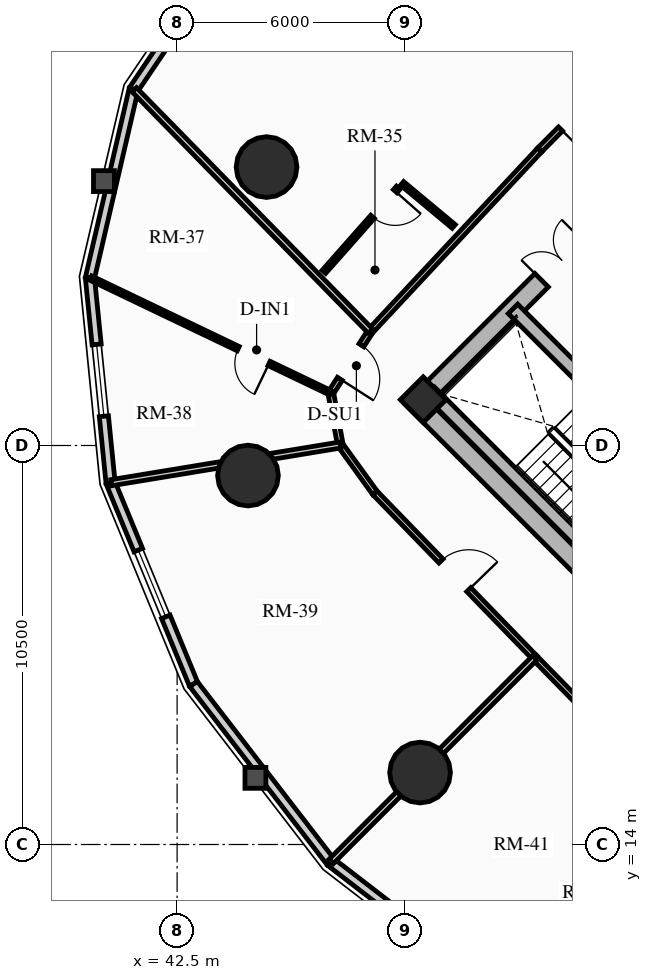
"""IFC4 building model, lengths in metres.
Left out: names, types, materials, properties, quantities, classifications, styles, units other than length and angle.
Written with IfcOpenShell. Run it as: python <this file> out.ifc"""

import sys

from ifc_helpers import new_model, si_unit, direction, frame, frame_2d, origin, origin_2d, place, context, subcontext, project, spatial, rectangle, circle, extrude, source, transform, mapped, element, fill, save


model = new_model("IFC4")
c1 = context("Model", 3, precision=1e-05, world=origin(), true_north=direction((0.0, 1.0)))
c2 = subcontext(c1, "Body", "Model", "MODEL_VIEW")
j1 = project(units=[si_unit("LENGTHUNIT", "METRE"), si_unit("PLANEANGLEUNIT", "RADIAN")], contexts=[c1])
p1 = place(None, origin())
s1 = spatial("IfcSite", under=j1, at=p1, CompositionType="ELEMENT")
p2 = place(p1, origin())
s2 = spatial("IfcBuilding", under=s1, at=p2, CompositionType="ELEMENT")
p3 = place(p2, frame((0.0, 0.0, 33.64)))
s3 = spatial("IfcBuildingStorey", under=s2, at=p3, CompositionType="ELEMENT", Elevation=33.64)
p4 = place(p3, frame((58.773, 15.661, 0.0), z_axis=(0.0, 0.0, 1.0), x_axis=(-0.707106781187, 0.707106781187, 0.0)))
e1 = element("IfcWall", 1, at=p4, inside=s3, PredefinedType="SHEAR", context=c2, shape_type="SweptSolid", body=[
    extrude(rectangle(XDim=14.3, YDim=0.5, at=frame_2d((7.15, 0.0))), origin(), (0.0, 0.0, 1.0), 2.91),
])
p5 = place(p3, frame((48.838, 25.596, 0.0), z_axis=(0.0, 0.0, 1.0), x_axis=(0.707106781187, 0.707106781187, 0.0)))
e2 = element("IfcWall", 2, at=p5, inside=s3, PredefinedType="SHEAR", context=c2, shape_type="SweptSolid", body=[
    extrude(rectangle(XDim=10.7, YDim=0.5, at=frame_2d((5.35, 0.0))), origin(), (0.0, 0.0, 1.0), 2.91),
])
m1 = source(origin(), c2, "Body", "SweptSolid", [
    extrude(rectangle(XDim=1.5, YDim=2.02, at=frame_2d((0.75, 1.01))), frame((0.0, 0.26, 0.0), z_axis=(0.0, -1.0, 0.0), x_axis=(1.0, 0.0, 0.0)), (0.0, 0.0, 1.0), 0.52),
])
p6 = place(p5, frame((4.6, 0.0, 0.0)))
e3 = element("IfcOpeningElement", 3, at=p6, cuts=e2, PredefinedType="OPENING", context=c2, shape_type="MappedRepresentation", body=[
    mapped(m1, transform((0.0, 0.0, 0.0), x_axis=(1.0, 0.0, 0.0), y_axis=(0.0, 1.0, 0.0), z_axis=(0.0, 0.0, 1.0), scale=1.0)),
])
p7 = place(p3, frame((61.096, 18.338, 0.0), z_axis=(0.0, 0.0, 1.0), x_axis=(-0.707106781187, 0.707106781187, 0.0)))
e4 = element("IfcWall", 4, at=p7, inside=s3, PredefinedType="SHEAR", context=c2, shape_type="SweptSolid", body=[
    extrude(rectangle(XDim=13.8, YDim=0.35, at=frame_2d((6.9, 0.0))), origin(), (0.0, 0.0, 1.0), 2.91),
])
m2 = source(origin(), c2, "Body", "SweptSolid", [
    extrude(rectangle(XDim=1.1, YDim=2.015, at=frame_2d((0.55, 1.007))), frame((0.0, 0.185, 0.0), z_axis=(0.0, -1.0, 0.0), x_axis=(1.0, 0.0, 0.0)), (0.0, 0.0, 1.0), 0.37),
])
p8 = place(p7, frame((4.9, 0.0, 0.0)))
e5 = element("IfcOpeningElement", 5, at=p8, cuts=e4, PredefinedType="OPENING", context=c2, shape_type="MappedRepresentation", body=[
    mapped(m2, transform((0.0, 0.0, 0.0), x_axis=(1.0, 0.0, 0.0), y_axis=(0.0, 1.0, 0.0), z_axis=(0.0, 0.0, 1.0), scale=1.0)),
])
m3 = source(origin(), c2, "Body", "SweptSolid", [
    extrude(rectangle(XDim=1.15, YDim=2.02, at=frame_2d((0.575, 1.01))), frame((0.0, 0.185, 0.0), z_axis=(0.0, -1.0, 0.0), x_axis=(1.0, 0.0, 0.0)), (0.0, 0.0, 1.0), 0.37),
])
p9 = place(p7, frame((7.32, 0.0, 0.0)))
e6 = element("IfcOpeningElement", 6, at=p9, cuts=e4, PredefinedType="OPENING", context=c2, shape_type="MappedRepresentation", body=[
    mapped(m3, transform((0.0, 0.0, 0.0), x_axis=(1.0, 0.0, 0.0), y_axis=(0.0, 1.0, 0.0), z_axis=(0.0, 0.0, 1.0), scale=1.0)),
])
p10 = place(p3, frame((53.922, 21.141, 0.0), z_axis=(0.0, 0.0, 1.0), x_axis=(-0.707106781187, 0.707106781187, 0.0)))
e7 = element("IfcWall", 7, at=p10, inside=s3, PredefinedType="SHEAR", context=c2, shape_type="SweptSolid", body=[
    extrude(rectangle(XDim=6.745, YDim=0.35, at=frame_2d((3.373, 0.0))), origin(), (0.0, 0.0, 1.0), 2.91),
])
p11 = place(p3, frame((48.976, 25.706, 0.0), z_axis=(0.0, 0.0, 1.0), x_axis=(0.707106781187, 0.707106781187, 0.0)))
e8 = element("IfcColumn", 8, at=p11, inside=s3, PredefinedType="COLUMN", context=c2, shape_type="SweptSolid", body=[
    extrude(rectangle(XDim=0.85, YDim=0.85, at=origin_2d()), origin(), (0.0, 0.0, 1.0), 2.91),
])
for number, where, z_axis, x_axis in (
    (9, (44.854, 31.827, 0.0), (0.0, 0.0, 1.0), (1.0, 0.0, 0.0)),
    (10, (44.365, 23.709, 0.0), (0.0, 0.0, 1.0), (1.0, 0.0, 0.0)),
    (11, (48.893, 15.893, 0.0), (0.0, 0.0, 1.0), (1.0, 0.0, 0.0)),
):
    element("IfcColumn", number, at=place(p3, frame(where, z_axis=z_axis, x_axis=x_axis)), inside=s3, PredefinedType="USERDEFINED", context=c2, shape_type="SweptSolid", body=[
        extrude(circle(Radius=0.8, at=origin_2d()), origin(), (0.0, 0.0, 1.0), 2.91),
    ])
p12 = place(p3, frame((41.356, 33.871, 0.0), z_axis=(0.0, 0.0, 1.0), x_axis=(0.559621532896, 0.828748297084, 0.0)))
e12 = element("IfcWall", 12, at=p12, inside=s3, PredefinedType="SOLIDWALL", context=c2, shape_type="SweptSolid", body=[
    extrude(rectangle(XDim=4.879, YDim=0.24, at=frame_2d((2.439, 0.0))), origin(), (0.0, 0.0, 1.0), 2.073),
])
m4 = source(origin(), c2, "Body", "SweptSolid", [
    extrude(rectangle(XDim=1.9, YDim=1.35, at=frame_2d((0.95, 0.675))), frame((0.0, 0.13, 0.0), z_axis=(0.0, -1.0, 0.0), x_axis=(1.0, 0.0, 0.0)), (0.0, 0.0, 1.0), 0.26),
])
p13 = place(p12, frame((1.489, 0.0, 0.65)))
e13 = element("IfcOpeningElement", 13, at=p13, cuts=e12, PredefinedType="OPENING", context=c2, shape_type="MappedRepresentation", body=[
    mapped(m4, transform((0.0, 0.0, 0.0), x_axis=(1.0, 0.0, 0.0), y_axis=(0.0, 1.0, 0.0), z_axis=(0.0, 0.0, 1.0), scale=1.0)),
])
p14 = place(p3, frame((40.206, 28.91, 0.0), z_axis=(0.0, 0.0, 1.0), x_axis=(0.22582585901, 0.974167686491, 0.0)))
e14 = element("IfcWall", 14, at=p14, inside=s3, PredefinedType="SOLIDWALL", context=c2, shape_type="SweptSolid", body=[
    extrude(rectangle(XDim=5.092, YDim=0.24, at=frame_2d((2.546, 0.0))), origin(), (0.0, 0.0, 1.0), 2.073),
])
p15 = place(p3, frame((40.749, 23.518, 0.0), z_axis=(0.0, 0.0, 1.0), x_axis=(-0.100190592135, 0.994968263437, 0.0)))
e15 = element("IfcWall", 15, at=p15, inside=s3, PredefinedType="SOLIDWALL", context=c2, shape_type="SweptSolid", body=[
    extrude(rectangle(XDim=5.419, YDim=0.24, at=frame_2d((2.71, 0.0))), origin(), (0.0, 0.0, 1.0), 2.073),
])
p16 = place(p15, frame((1.76, 0.0, 0.65)))
e16 = element("IfcOpeningElement", 16, at=p16, cuts=e15, PredefinedType="OPENING", context=c2, shape_type="MappedRepresentation", body=[
    mapped(m4, transform((0.0, 0.0, 0.0), x_axis=(1.0, 0.0, 0.0), y_axis=(0.0, 1.0, 0.0), z_axis=(0.0, 0.0, 1.0), scale=1.0)),
])
p17 = place(p3, frame((42.932, 18.222, 0.0), z_axis=(0.0, 0.0, 1.0), x_axis=(-0.381077764176, 0.924542988536, 0.0)))
e17 = element("IfcWall", 17, at=p17, inside=s3, PredefinedType="SOLIDWALL", context=c2, shape_type="SweptSolid", body=[
    extrude(rectangle(XDim=5.728, YDim=0.24, at=frame_2d((2.864, 0.0))), origin(), (0.0, 0.0, 1.0), 2.073),
])
p18 = place(p17, frame((1.914, 0.0, 0.65)))
e18 = element("IfcOpeningElement", 18, at=p18, cuts=e17, PredefinedType="OPENING", context=c2, shape_type="MappedRepresentation", body=[
    mapped(m4, transform((0.0, 0.0, 0.0), x_axis=(1.0, 0.0, 0.0), y_axis=(0.0, 1.0, 0.0), z_axis=(0.0, 0.0, 1.0), scale=1.0)),
])
p19 = place(p3, frame((46.541, 13.541, 0.0), z_axis=(0.0, 0.0, 1.0), x_axis=(-0.610494906082, 0.792020182601, 0.0)))
e19 = element("IfcWall", 19, at=p19, inside=s3, PredefinedType="SOLIDWALL", context=c2, shape_type="SweptSolid", body=[
    extrude(rectangle(XDim=5.911, YDim=0.24, at=frame_2d((2.956, 0.0))), origin(), (0.0, 0.0, 1.0), 2.073),
])
p20 = place(p3, frame((51.222, 9.932, 0.0), z_axis=(0.0, 0.0, 1.0), x_axis=(-0.792020182601, 0.610494906082, 0.0)))
e20 = element("IfcWall", 20, at=p20, inside=s3, PredefinedType="SOLIDWALL", context=c2, shape_type="SweptSolid", body=[
    extrude(rectangle(XDim=5.911, YDim=0.24, at=frame_2d((2.956, 0.0))), origin(), (0.0, 0.0, 1.0), 2.073),
])
p21 = place(p20, frame((2.005, 0.0, 0.65)))
e21 = element("IfcOpeningElement", 21, at=p21, cuts=e20, PredefinedType="OPENING", context=c2, shape_type="MappedRepresentation", body=[
    mapped(m4, transform((0.0, 0.0, 0.0), x_axis=(1.0, 0.0, 0.0), y_axis=(0.0, 1.0, 0.0), z_axis=(0.0, 0.0, 1.0), scale=1.0)),
])
p22 = place(p3, frame((54.427, 34.683, 0.0), z_axis=(0.0, 0.0, 1.0), x_axis=(-0.704178989986, -0.710022499687, 0.0)))
e22 = element("IfcWall", 22, at=p22, inside=s3, PredefinedType="PARTITIONING", context=c2, shape_type="SweptSolid", body=[
    extrude(rectangle(XDim=3.384, YDim=0.15, at=frame_2d((1.692, 0.0))), origin(), (0.0, 0.0, 1.0), 2.159),
])
m5 = source(origin(), c2, "Body", "SweptSolid", [
    extrude(rectangle(XDim=1.05, YDim=2.015, at=frame_2d((0.525, 1.007))), frame((0.0, 0.085, 0.0), z_axis=(0.0, -1.0, 0.0), x_axis=(1.0, 0.0, 0.0)), (0.0, 0.0, 1.0), 0.17),
])
p23 = place(p22, frame((1.56, 0.0, 0.0)))
e23 = element("IfcOpeningElement", 23, at=p23, cuts=e22, PredefinedType="OPENING", context=c2, shape_type="MappedRepresentation", body=[
    mapped(m5, transform((0.0, 0.0, 0.0), x_axis=(1.0, 0.0, 0.0), y_axis=(0.0, 1.0, 0.0), z_axis=(0.0, 0.0, 1.0), scale=1.0)),
])
p24 = place(p3, frame((52.043, 32.28, 0.0), z_axis=(0.0, 0.0, 1.0), x_axis=(-0.682606081633, -0.730786519661, 0.0)))
e24 = element("IfcWall", 24, at=p24, inside=s3, PredefinedType="PARTITIONING", context=c2, shape_type="SweptSolid", body=[
    extrude(rectangle(XDim=6.527, YDim=0.15, at=frame_2d((3.263, 0.0))), origin(), (0.0, 0.0, 1.0), 2.159),
])
p25 = place(p3, frame((47.588, 27.51, 0.0), z_axis=(0.0, 0.0, 1.0), x_axis=(-0.540202619347, -0.841534984449, 0.0)))
e25 = element("IfcWall", 25, at=p25, inside=s3, PredefinedType="PARTITIONING", context=c2, shape_type="SweptSolid", body=[
    extrude(rectangle(XDim=1.935, YDim=0.15, at=frame_2d((0.967, 0.0))), origin(), (0.0, 0.0, 1.0), 2.159),
])
p26 = place(p25, frame((0.442, 0.0, 0.0)))
e26 = element("IfcOpeningElement", 26, at=p26, cuts=e25, PredefinedType="OPENING", context=c2, shape_type="MappedRepresentation", body=[
    mapped(m5, transform((0.0, 0.0, 0.0), x_axis=(1.0, 0.0, 0.0), y_axis=(0.0, 1.0, 0.0), z_axis=(0.0, 0.0, 1.0), scale=1.0)),
])
p27 = place(p3, frame((46.543, 25.882, 0.0), z_axis=(0.0, 0.0, 1.0), x_axis=(0.181153502579, -0.983454832976, 0.0)))
e27 = element("IfcWall", 27, at=p27, inside=s3, PredefinedType="PARTITIONING", context=c2, shape_type="SweptSolid", body=[
    extrude(rectangle(XDim=1.392, YDim=0.15, at=frame_2d((0.696, 0.0))), origin(), (0.0, 0.0, 1.0), 2.159),
])
p28 = place(p3, frame((46.795, 24.513, 0.0), z_axis=(0.0, 0.0, 1.0), x_axis=(0.585628197524, -0.810579801294, 0.0)))
e28 = element("IfcWall", 28, at=p28, inside=s3, PredefinedType="PARTITIONING", context=c2, shape_type="SweptSolid", body=[
    extrude(rectangle(XDim=1.554, YDim=0.15, at=frame_2d((0.777, 0.0))), origin(), (0.0, 0.0, 1.0), 2.205),
])
p29 = place(p3, frame((47.706, 23.253, 0.0), z_axis=(0.0, 0.0, 1.0), x_axis=(0.696179266346, -0.717867974707, 0.0)))
e29 = element("IfcWall", 29, at=p29, inside=s3, PredefinedType="PARTITIONING", context=c2, shape_type="SweptSolid", body=[
    extrude(rectangle(XDim=6.045, YDim=0.15, at=frame_2d((3.022, 0.0))), origin(), (0.0, 0.0, 1.0), 2.635),
])
p30 = place(p29, frame((2.497, 0.0, 0.0)))
e30 = element("IfcOpeningElement", 30, at=p30, cuts=e29, PredefinedType="OPENING", context=c2, shape_type="MappedRepresentation", body=[
    mapped(m5, transform((0.0, 0.0, 0.0), x_axis=(1.0, 0.0, 0.0), y_axis=(0.0, 1.0, 0.0), z_axis=(0.0, 0.0, 1.0), scale=1.0)),
])
p31 = place(p3, frame((51.914, 18.914, 0.0), z_axis=(0.0, 0.0, 1.0), x_axis=(0.699999313799, -0.714143515465, 0.0)))
e31 = element("IfcWall", 31, at=p31, inside=s3, PredefinedType="PARTITIONING", context=c2, shape_type="SweptSolid", body=[
    extrude(rectangle(XDim=6.162, YDim=0.15, at=frame_2d((3.081, 0.0))), origin(), (0.0, 0.0, 1.0), 2.159),
])
p32 = place(p31, frame((2.556, 0.0, 0.0)))
e32 = element("IfcOpeningElement", 32, at=p32, cuts=e31, PredefinedType="OPENING", context=c2, shape_type="MappedRepresentation", body=[
    mapped(m5, transform((0.0, 0.0, 0.0), x_axis=(1.0, 0.0, 0.0), y_axis=(0.0, 1.0, 0.0), z_axis=(0.0, 0.0, 1.0), scale=1.0)),
])
p33 = place(p3, frame((54.427, 34.683, 0.0), z_axis=(0.0, 0.0, 1.0), x_axis=(-0.726732956694, 0.686920089716, 0.0)))
e33 = element("IfcWall", 33, at=p33, inside=s3, PredefinedType="PARTITIONING", context=c2, shape_type="SweptSolid", body=[
    extrude(rectangle(XDim=8.653, YDim=0.16, at=frame_2d((4.326, 0.0))), origin(), (0.0, 0.0, 1.0), 2.073),
])
p34 = place(p3, frame((47.588, 27.51, 0.0), z_axis=(0.0, 0.0, 1.0), x_axis=(-0.699371977892, 0.714757886657, 0.0)))
e34 = element("IfcWall", 34, at=p34, inside=s3, PredefinedType="PARTITIONING", context=c2, shape_type="SweptSolid", body=[
    extrude(rectangle(XDim=8.886, YDim=0.16, at=frame_2d((4.443, 0.0))), origin(), (0.0, 0.0, 1.0), 2.073),
])
p35 = place(p3, frame((46.795, 24.513, 0.0), z_axis=(0.0, 0.0, 1.0), x_axis=(-0.986729986004, -0.162369746937, 0.0)))
e35 = element("IfcWall", 35, at=p35, inside=s3, PredefinedType="PARTITIONING", context=c2, shape_type="SweptSolid", body=[
    extrude(rectangle(XDim=6.108, YDim=0.16, at=frame_2d((3.054, 0.0))), origin(), (0.0, 0.0, 1.0), 2.073),
])
p36 = place(p3, frame((51.914, 18.914, 0.0), z_axis=(0.0, 0.0, 1.0), x_axis=(-0.707106781187, -0.707106781187, 0.0)))
e36 = element("IfcWall", 36, at=p36, inside=s3, PredefinedType="PARTITIONING", context=c2, shape_type="SweptSolid", body=[
    extrude(rectangle(XDim=7.579, YDim=0.16, at=frame_2d((3.79, 0.0))), origin(), (0.0, 0.0, 1.0), 2.073),
])
p37 = place(p3, frame((49.78, 30.264, 0.0), z_axis=(0.0, 0.0, 1.0), x_axis=(-0.768209972595, 0.640197967824, 0.0)))
e37 = element("IfcWall", 37, at=p37, inside=s3, PredefinedType="PARTITIONING", context=c2, shape_type="SweptSolid", body=[
    extrude(rectangle(XDim=1.77, YDim=0.125, at=frame_2d((0.885, 0.0))), origin(), (0.0, 0.0, 1.0), 2.635),
])
p38 = place(p3, frame((48.318, 31.282, 0.0), z_axis=(0.0, 0.0, 1.0), x_axis=(-0.662365127428, -0.749181178333, 0.0)))
e38 = element("IfcWall", 38, at=p38, inside=s3, PredefinedType="PARTITIONING", context=c2, shape_type="SweptSolid", body=[
    extrude(rectangle(XDim=2.953, YDim=0.125, at=frame_2d((1.477, 0.0))), origin(), (0.0, 0.0, 1.0), 2.159),
])
m6 = source(origin(), c2, "Body", "SweptSolid", [
    extrude(rectangle(XDim=0.9, YDim=2.005, at=frame_2d((0.45, 1.002))), frame((0.0, 0.073, 0.0), z_axis=(0.0, -1.0, 0.0), x_axis=(1.0, 0.0, 0.0)), (0.0, 0.0, 1.0), 0.145),
])
p39 = place(p38, frame((0.12, 0.0, 0.0)))
e39 = element("IfcOpeningElement", 39, at=p39, cuts=e38, PredefinedType="OPENING", context=c2, shape_type="MappedRepresentation", body=[
    mapped(m6, transform((0.0, 0.0, 0.0), x_axis=(1.0, 0.0, 0.0), y_axis=(0.0, 1.0, 0.0), z_axis=(0.0, 0.0, 1.0), scale=1.0)),
])
p40 = place(p3, frame((46.543, 25.882, 0.0), z_axis=(0.0, 0.0, 1.0), x_axis=(-0.901937110034, 0.431867398103, 0.0)))
e40 = element("IfcWall", 40, at=p40, inside=s3, PredefinedType="PARTITIONING", context=c2, shape_type="SweptSolid", body=[
    extrude(rectangle(XDim=7.004, YDim=0.125, at=frame_2d((3.502, 0.0))), origin(), (0.0, 0.0, 1.0), 2.073),
])
p41 = place(p40, frame((1.8, 0.0, 0.0)))
e41 = element("IfcOpeningElement", 41, at=p41, cuts=e40, PredefinedType="OPENING", context=c2, shape_type="MappedRepresentation", body=[
    mapped(m6, transform((0.0, 0.0, 0.0), x_axis=(1.0, 0.0, 0.0), y_axis=(0.0, 1.0, 0.0), z_axis=(0.0, 0.0, 1.0), scale=1.0)),
])
m7 = source(origin(), c2, "Body", "SweptSolid", [
    extrude(rectangle(XDim=1.9, YDim=1.35, at=frame_2d((0.95, 0.675))), frame((0.0, 0.03, 0.0), z_axis=(0.0, -1.0, 0.0), x_axis=(1.0, 0.0, 0.0)), (0.0, 0.0, 1.0), 0.06),
])
p42 = place(p16, origin())
e42 = element("IfcWindow", 42, at=p42, inside=s3, PartitioningType="DOUBLE_PANEL_VERTICAL", PredefinedType="WINDOW", context=c2, shape_type="MappedRepresentation", body=[
    mapped(m7, transform((0.0, 0.0, 0.0), x_axis=(1.0, 0.0, 0.0), y_axis=(0.0, 1.0, 0.0), z_axis=(0.0, 0.0, 1.0), scale=1.0)),
])
fill(e16, e42)
p43 = place(p18, origin())
e43 = element("IfcWindow", 43, at=p43, inside=s3, PartitioningType="DOUBLE_PANEL_VERTICAL", PredefinedType="WINDOW", context=c2, shape_type="MappedRepresentation", body=[
    mapped(m7, transform((0.0, 0.0, 0.0), x_axis=(1.0, 0.0, 0.0), y_axis=(0.0, 1.0, 0.0), z_axis=(0.0, 0.0, 1.0), scale=1.0)),
])
fill(e18, e43)
m8 = source(origin(), c2, "Body", "SweptSolid", [
    extrude(rectangle(XDim=1.5, YDim=2.02, at=frame_2d((0.75, 1.01))), frame((0.0, 0.025, 0.0), z_axis=(0.0, -1.0, 0.0), x_axis=(1.0, 0.0, 0.0)), (0.0, 0.0, 1.0), 0.05),
])
p44 = place(p6, origin())
e44 = element("IfcDoor", 44, at=p44, inside=s3, OperationType="DOUBLE_DOOR_SINGLE_SWING", PredefinedType="DOOR", context=c2, shape_type="MappedRepresentation", body=[
    mapped(m8, transform((0.0, 0.0, 0.0), x_axis=(1.0, 0.0, 0.0), y_axis=(0.0, 1.0, 0.0), z_axis=(0.0, 0.0, 1.0), scale=1.0)),
])
fill(e3, e44)
m9 = source(origin(), c2, "Body", "SweptSolid", [
    extrude(rectangle(XDim=1.05, YDim=2.015, at=frame_2d((0.525, 1.007))), frame((0.0, 0.025, 0.0), z_axis=(0.0, -1.0, 0.0), x_axis=(1.0, 0.0, 0.0)), (0.0, 0.0, 1.0), 0.05),
])
p45 = place(p23, origin())
e45 = element("IfcDoor", 45, at=p45, inside=s3, OperationType="SINGLE_SWING_RIGHT", PredefinedType="DOOR", context=c2, shape_type="MappedRepresentation", body=[
    mapped(m9, transform((0.0, 0.0, 0.0), x_axis=(1.0, 0.0, 0.0), y_axis=(0.0, 1.0, 0.0), z_axis=(0.0, 0.0, 1.0), scale=1.0)),
])
fill(e23, e45)
m10 = source(origin(), c2, "Body", "SweptSolid", [
    extrude(rectangle(XDim=0.9, YDim=2.005, at=frame_2d((0.45, 1.002))), frame((0.0, 0.025, 0.0), z_axis=(0.0, -1.0, 0.0), x_axis=(1.0, 0.0, 0.0)), (0.0, 0.0, 1.0), 0.05),
])
p46 = place(p39, origin())
e46 = element("IfcDoor", 46, at=p46, inside=s3, OperationType="SINGLE_SWING_LEFT", PredefinedType="DOOR", context=c2, shape_type="MappedRepresentation", body=[
    mapped(m10, transform((0.0, 0.0, 0.0), x_axis=(1.0, 0.0, 0.0), y_axis=(0.0, 1.0, 0.0), z_axis=(0.0, 0.0, 1.0), scale=1.0)),
])
fill(e39, e46)
p47 = place(p26, origin())
e47 = element("IfcDoor", 47, at=p47, inside=s3, OperationType="SINGLE_SWING_RIGHT", PredefinedType="DOOR", context=c2, shape_type="MappedRepresentation", body=[
    mapped(m9, transform((0.0, 0.0, 0.0), x_axis=(1.0, 0.0, 0.0), y_axis=(0.0, 1.0, 0.0), z_axis=(0.0, 0.0, 1.0), scale=1.0)),
])
fill(e26, e47)
p48 = place(p41, origin())
e48 = element("IfcDoor", 48, at=p48, inside=s3, OperationType="SINGLE_SWING_LEFT", PredefinedType="DOOR", context=c2, shape_type="MappedRepresentation", body=[
    mapped(m10, transform((0.0, 0.0, 0.0), x_axis=(1.0, 0.0, 0.0), y_axis=(0.0, 1.0, 0.0), z_axis=(0.0, 0.0, 1.0), scale=1.0)),
])
fill(e41, e48)
p49 = place(p30, origin())
e49 = element("IfcDoor", 49, at=p49, inside=s3, OperationType="SINGLE_SWING_RIGHT", PredefinedType="DOOR", context=c2, shape_type="MappedRepresentation", body=[
    mapped(m9, transform((0.0, 0.0, 0.0), x_axis=(1.0, 0.0, 0.0), y_axis=(0.0, 1.0, 0.0), z_axis=(0.0, 0.0, 1.0), scale=1.0)),
])
fill(e30, e49)
save(model, sys.argv[1])
